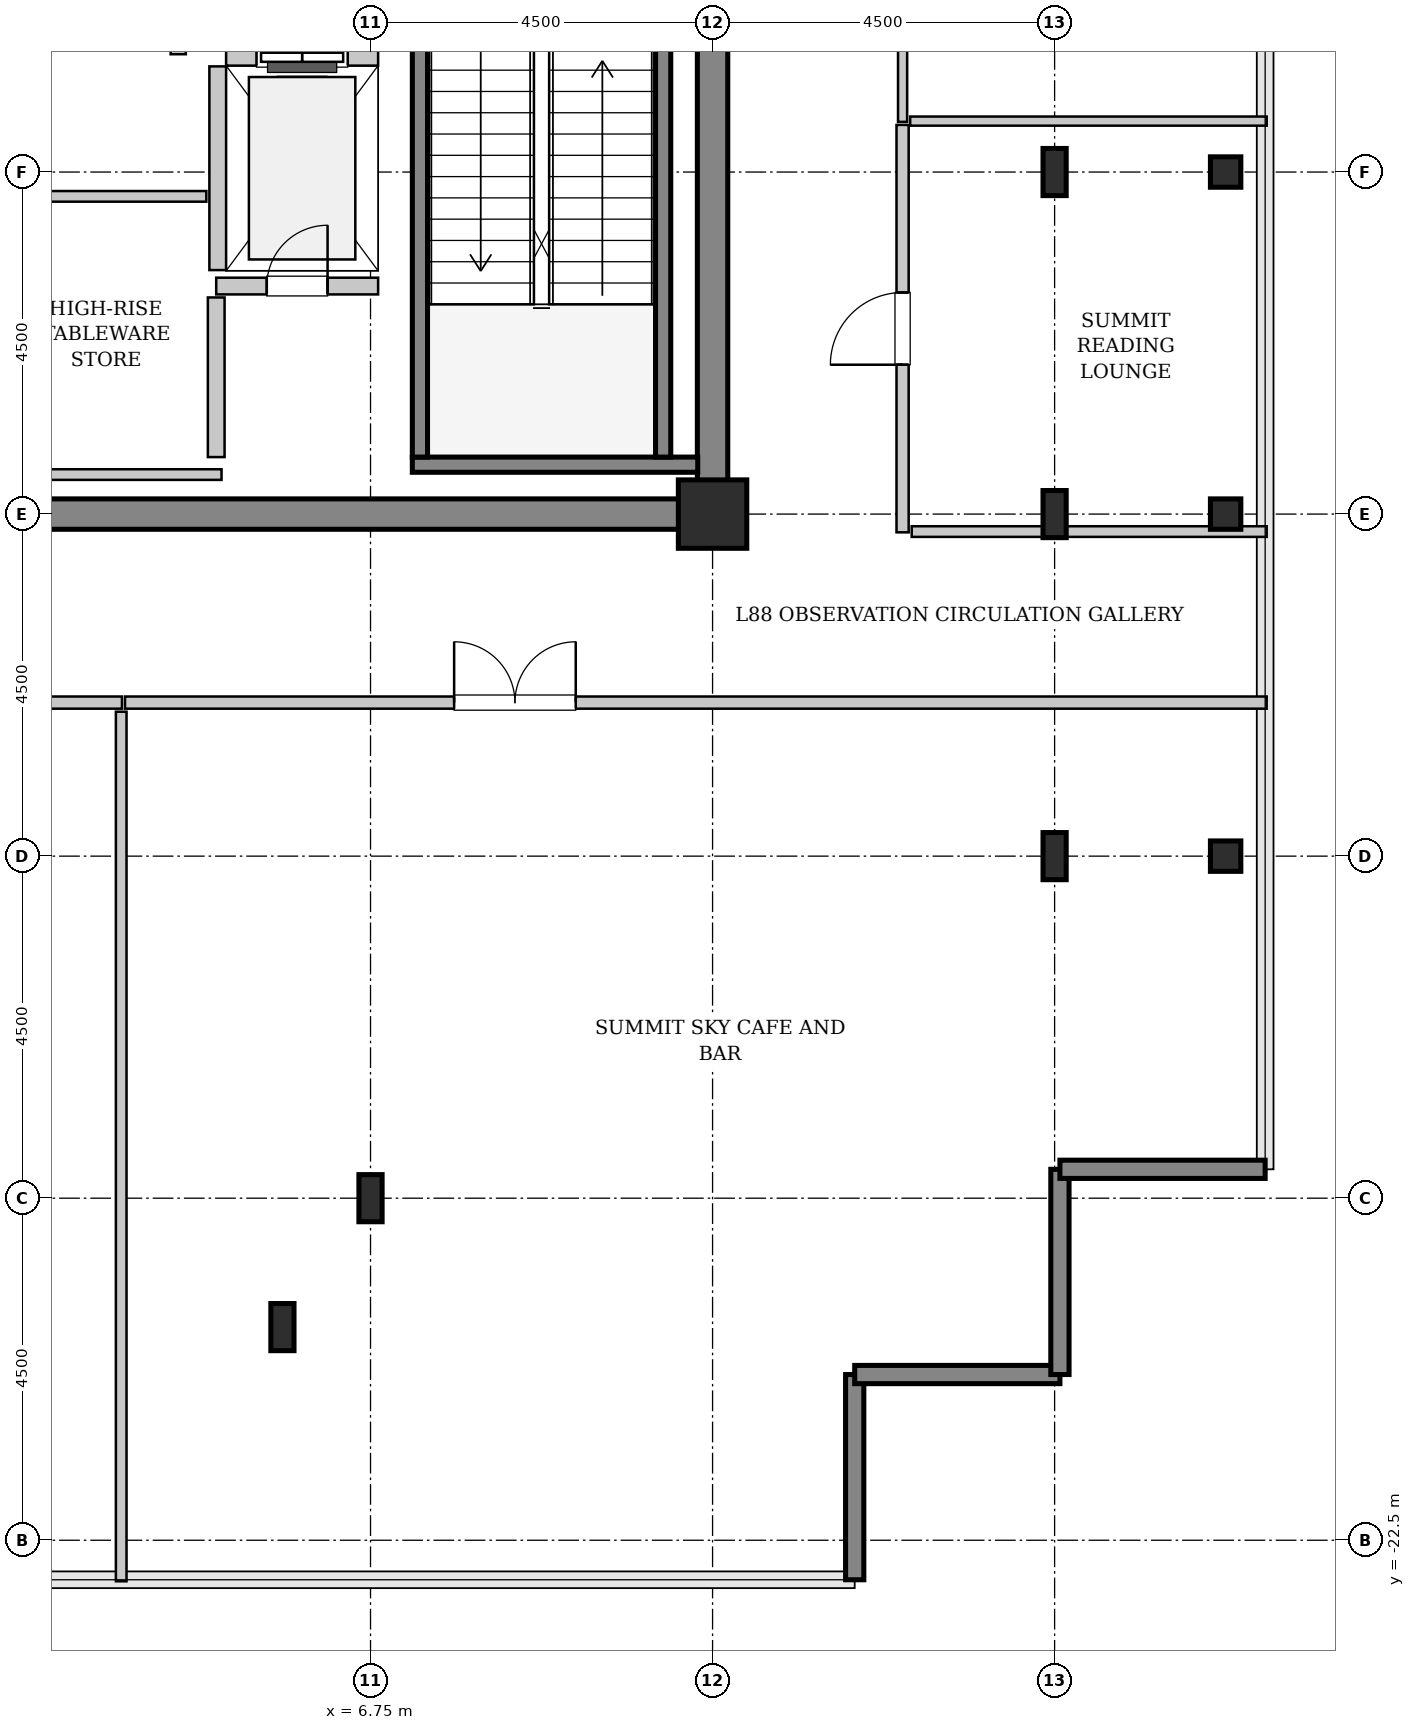
"""IFC4 building model, lengths in metres.
Left out: names, types, materials, properties, quantities, classifications, styles, units other than length and angle.
Written with IfcOpenShell. Run it as: python <this file> out.ifc"""

import sys

from ifc_helpers import new_model, si_unit, direction, frame, frame_2d, origin, origin_2d, place, context, subcontext, project, spatial, rectangle, hollow_rectangle, i_section, extrude, source, transform, mapped, element, fill, save


model = new_model("IFC4")
c1 = context("Model", 3, precision=1e-05, world=origin(), true_north=direction((0.0, 1.0)))
c2 = subcontext(c1, "Body", "Model", "MODEL_VIEW")
j1 = project(units=[si_unit("LENGTHUNIT", "METRE"), si_unit("PLANEANGLEUNIT", "RADIAN")], contexts=[c1])
p1 = place(None, origin())
s1 = spatial("IfcSite", under=j1, at=p1, CompositionType="ELEMENT")
p2 = place(p1, origin())
s2 = spatial("IfcBuilding", under=s1, at=p2, CompositionType="ELEMENT")
p3 = place(p2, frame((0.0, 0.0, 349.0)))
s3 = spatial("IfcBuildingStorey", under=s2, at=p3, CompositionType="ELEMENT", Elevation=349.0)
m1 = source(origin(), c2, "Body", "SweptSolid", [
    extrude(rectangle(XDim=9.9, YDim=0.4, at=frame_2d((4.95, 0.0))), origin(), (0.0, 0.0, 1.0), 4.8),
])
p4 = place(p3, frame((1.55, -9.0, 0.0), z_axis=(0.0, 0.0, 1.0), x_axis=(1.0, 0.0, 0.0)))
e1 = element("IfcWall", 1, at=p4, inside=s3, PredefinedType="SHEAR", context=c2, shape_type="MappedRepresentation", body=[
    mapped(m1, transform((0.0, 0.0, 0.0), x_axis=(1.0, 0.0, 0.0), y_axis=(0.0, 1.0, 0.0), z_axis=(0.0, 0.0, 1.0), scale=1.0)),
])
m2 = source(origin(), c2, "Body", "SweptSolid", [
    extrude(rectangle(XDim=7.45, YDim=0.4, at=frame_2d((3.725, 0.0))), origin(), (0.0, 0.0, 1.0), 4.8),
])
p5 = place(p3, frame((11.25, -8.8, 0.0), z_axis=(0.0, 0.0, 1.0), x_axis=(0.0, 1.0, 0.0)))
e2 = element("IfcWall", 2, at=p5, inside=s3, PredefinedType="SHEAR", context=c2, shape_type="MappedRepresentation", body=[
    mapped(m2, transform((0.0, 0.0, 0.0), x_axis=(1.0, 0.0, 0.0), y_axis=(0.0, 1.0, 0.0), z_axis=(0.0, 0.0, 1.0), scale=1.0)),
])
m3 = source(origin(), c2, "Body", "SweptSolid", [
    extrude(i_section(OverallWidth=0.305, OverallDepth=0.62, WebThickness=0.021, FlangeThickness=0.04, FilletRadius=0.027, at=origin_2d()), origin(), (0.0, 0.0, 1.0), 4.8),
])
for number, where, z_axis, x_axis in (
    (3, (5.591, -19.696, 0.0), (0.0, 0.0, 1.0), (1.0, 0.0, 0.0)),
    (4, (6.75, -18.0, 0.0), (0.0, 0.0, 1.0), (1.0, 0.0, 0.0)),
):
    element("IfcColumn", number, at=place(p3, frame(where, z_axis=z_axis, x_axis=x_axis)), inside=s3, PredefinedType="COLUMN", context=c2, shape_type="MappedRepresentation", body=[
        mapped(m3, transform((0.0, 0.0, 0.0), x_axis=(1.0, 0.0, 0.0), y_axis=(0.0, 1.0, 0.0), z_axis=(0.0, 0.0, 1.0), scale=1.0)),
    ])
m4 = source(origin(), c2, "Body", "SweptSolid", [
    extrude(rectangle(XDim=0.9, YDim=0.9, at=origin_2d()), origin(), (0.0, 0.0, 1.0), 4.8),
])
p6 = place(p3, frame((11.25, -9.0, 0.0), z_axis=(0.0, 0.0, 1.0), x_axis=(1.0, 0.0, 0.0)))
e5 = element("IfcColumn", 5, at=p6, inside=s3, PredefinedType="COLUMN", context=c2, shape_type="MappedRepresentation", body=[
    mapped(m4, transform((0.0, 0.0, 0.0), x_axis=(1.0, 0.0, 0.0), y_axis=(0.0, 1.0, 0.0), z_axis=(0.0, 0.0, 1.0), scale=1.0)),
])
for number, where, z_axis, x_axis in (
    (6, (15.75, -13.5, 0.0), (0.0, 0.0, 1.0), (1.0, 0.0, 0.0)),
    (7, (15.75, -9.0, 0.0), (0.0, 0.0, 1.0), (1.0, 0.0, 0.0)),
    (8, (15.75, -4.5, 0.0), (0.0, 0.0, 1.0), (1.0, 0.0, 0.0)),
):
    element("IfcColumn", number, at=place(p3, frame(where, z_axis=z_axis, x_axis=x_axis)), inside=s3, PredefinedType="COLUMN", context=c2, shape_type="MappedRepresentation", body=[
        mapped(m3, transform((0.0, 0.0, 0.0), x_axis=(1.0, 0.0, 0.0), y_axis=(0.0, 1.0, 0.0), z_axis=(0.0, 0.0, 1.0), scale=1.0)),
    ])
m5 = source(origin(), c2, "Body", "SweptSolid", [
    extrude(hollow_rectangle(XDim=0.4, YDim=0.4, WallThickness=0.02, InnerFilletRadius=0.02, OuterFilletRadius=0.04, at=origin_2d()), origin(), (0.0, 0.0, 1.0), 4.8),
])
for number, where, z_axis, x_axis in (
    (9, (18.0, -13.5, 0.0), (0.0, 0.0, 1.0), (1.0, 0.0, 0.0)),
    (10, (18.0, -9.0, 0.0), (0.0, 0.0, 1.0), (1.0, 0.0, 0.0)),
    (11, (18.0, -4.5, 0.0), (0.0, 0.0, 1.0), (1.0, 0.0, 0.0)),
):
    element("IfcColumn", number, at=place(p3, frame(where, z_axis=z_axis, x_axis=x_axis)), inside=s3, PredefinedType="COLUMN", context=c2, shape_type="MappedRepresentation", body=[
        mapped(m5, transform((0.0, 0.0, 0.0), x_axis=(1.0, 0.0, 0.0), y_axis=(0.0, 1.0, 0.0), z_axis=(0.0, 0.0, 1.0), scale=1.0)),
    ])
m6 = source(origin(), c2, "Body", "SweptSolid", [
    extrude(rectangle(XDim=2.7, YDim=0.24, at=frame_2d((1.35, 0.0))), origin(), (0.0, 0.0, 1.0), 4.5),
])
for number, where, z_axis, x_axis in (
    (12, (13.12, -23.02, 0.0), (0.0, 0.0, 1.0), (0.0, 1.0, 0.0)),
    (13, (13.12, -20.32, 0.0), (0.0, 0.0, 1.0), (1.0, 0.0, 0.0)),
    (14, (15.82, -20.32, 0.0), (0.0, 0.0, 1.0), (0.0, 1.0, 0.0)),
    (15, (15.82, -17.62, 0.0), (0.0, 0.0, 1.0), (1.0, 0.0, 0.0)),
):
    element("IfcWall", number, at=place(p3, frame(where, z_axis=z_axis, x_axis=x_axis)), inside=s3, PredefinedType="SHEAR", context=c2, shape_type="MappedRepresentation", body=[
        mapped(m6, transform((0.0, 0.0, 0.0), x_axis=(1.0, 0.0, 0.0), y_axis=(0.0, 1.0, 0.0), z_axis=(0.0, 0.0, 1.0), scale=1.0)),
    ])
m7 = source(origin(), c2, "Body", "SweptSolid", [
    extrude(rectangle(XDim=3.755, YDim=0.2, at=frame_2d((1.877, 0.0))), origin(), (0.0, 0.0, 1.0), 4.8),
])
p7 = place(p3, frame((7.3, -8.35, 0.0), z_axis=(0.0, 0.0, 1.0), x_axis=(1.0, 0.0, 0.0)))
e16 = element("IfcWall", 16, at=p7, inside=s3, PredefinedType="SOLIDWALL", context=c2, shape_type="MappedRepresentation", body=[
    mapped(m7, transform((0.0, 0.0, 0.0), x_axis=(1.0, 0.0, 0.0), y_axis=(0.0, 1.0, 0.0), z_axis=(0.0, 0.0, 1.0), scale=1.0)),
])
m8 = source(origin(), c2, "Body", "SweptSolid", [
    extrude(rectangle(XDim=7.1, YDim=0.2, at=frame_2d((3.55, 0.0))), origin(), (0.0, 0.0, 1.0), 4.8),
])
p8 = place(p3, frame((7.4, -1.15, 0.0), z_axis=(0.0, 0.0, 1.0), x_axis=(0.0, -1.0, 0.0)))
e17 = element("IfcWall", 17, at=p8, inside=s3, PredefinedType="SOLIDWALL", context=c2, shape_type="MappedRepresentation", body=[
    mapped(m8, transform((0.0, 0.0, 0.0), x_axis=(1.0, 0.0, 0.0), y_axis=(0.0, 1.0, 0.0), z_axis=(0.0, 0.0, 1.0), scale=1.0)),
])
p9 = place(p8, frame((0.18, 0.0, 0.0)))
e18 = element("IfcOpeningElement", 18, at=p9, cuts=e17, PredefinedType="OPENING", context=c2, shape_type="SweptSolid", body=[
    extrude(rectangle(XDim=1.1, YDim=2.15, at=frame_2d((0.55, 1.075))), frame((0.0, 0.11, 0.0), z_axis=(0.0, -1.0, 0.0), x_axis=(1.0, 0.0, 0.0)), (0.0, 0.0, 1.0), 0.22),
])
p10 = place(p3, frame((10.6, -1.15, 0.0), z_axis=(0.0, 0.0, 1.0), x_axis=(0.0, -1.0, 0.0)))
e19 = element("IfcWall", 19, at=p10, inside=s3, PredefinedType="SOLIDWALL", context=c2, shape_type="MappedRepresentation", body=[
    mapped(m8, transform((0.0, 0.0, 0.0), x_axis=(1.0, 0.0, 0.0), y_axis=(0.0, 1.0, 0.0), z_axis=(0.0, 0.0, 1.0), scale=1.0)),
])
m9 = source(origin(), c2, "Body", "SweptSolid", [
    extrude(rectangle(XDim=2.0, YDim=0.22, at=frame_2d((1.0, 0.0))), origin(), (0.0, 0.0, 1.0), 4.485),
])
p11 = place(p3, frame((6.85, -2.99, 0.0), z_axis=(0.0, 0.0, 1.0), x_axis=(-1.0, 0.0, 0.0)))
e20 = element("IfcWall", 20, at=p11, inside=s3, PredefinedType="SOLIDWALL", context=c2, shape_type="MappedRepresentation", body=[
    mapped(m9, transform((0.0, 0.0, 0.0), x_axis=(1.0, 0.0, 0.0), y_axis=(0.0, 1.0, 0.0), z_axis=(0.0, 0.0, 1.0), scale=1.0)),
])
p12 = place(p11, frame((0.4, 0.0, 0.0)))
e21 = element("IfcOpeningElement", 21, at=p12, cuts=e20, PredefinedType="OPENING", context=c2, shape_type="SweptSolid", body=[
    extrude(rectangle(XDim=1.2, YDim=2.2, at=frame_2d((0.6, 1.1))), frame((0.0, 0.12, 0.0), z_axis=(0.0, -1.0, 0.0), x_axis=(1.0, 0.0, 0.0)), (0.0, 0.0, 1.0), 0.24),
])
m10 = source(origin(), c2, "Body", "SweptSolid", [
    extrude(rectangle(XDim=2.68, YDim=0.22, at=frame_2d((1.34, 0.0))), origin(), (0.0, 0.0, 1.0), 4.485),
])
p13 = place(p3, frame((4.74, -3.11, 0.0), z_axis=(0.0, 0.0, 1.0), x_axis=(0.0, -1.0, 0.0)))
e22 = element("IfcWall", 22, at=p13, inside=s3, PredefinedType="SOLIDWALL", context=c2, shape_type="MappedRepresentation", body=[
    mapped(m10, transform((0.0, 0.0, 0.0), x_axis=(1.0, 0.0, 0.0), y_axis=(0.0, 1.0, 0.0), z_axis=(0.0, 0.0, 1.0), scale=1.0)),
])
m11 = source(origin(), c2, "Body", "SweptSolid", [
    extrude(rectangle(XDim=2.13, YDim=0.22, at=frame_2d((1.065, 0.0))), origin(), (0.0, 0.0, 1.0), 4.485),
])
p14 = place(p3, frame((4.72, -6.0, 0.0), z_axis=(0.0, 0.0, 1.0), x_axis=(1.0, 0.0, 0.0)))
e23 = element("IfcWall", 23, at=p14, inside=s3, PredefinedType="SOLIDWALL", context=c2, shape_type="MappedRepresentation", body=[
    mapped(m11, transform((0.0, 0.0, 0.0), x_axis=(1.0, 0.0, 0.0), y_axis=(0.0, 1.0, 0.0), z_axis=(0.0, 0.0, 1.0), scale=1.0)),
])
p15 = place(p14, frame((0.665, 0.0, 0.0)))
e24 = element("IfcOpeningElement", 24, at=p15, cuts=e23, PredefinedType="OPENING", context=c2, shape_type="SweptSolid", body=[
    extrude(rectangle(XDim=0.8, YDim=2.0, at=frame_2d((0.4, 1.0))), frame((0.0, 0.12, 0.0), z_axis=(0.0, -1.0, 0.0), x_axis=(1.0, 0.0, 0.0)), (0.0, 0.0, 1.0), 0.24),
])
m12 = source(origin(), c2, "Body", "SweptSolid", [
    extrude(rectangle(XDim=2.1, YDim=0.22, at=frame_2d((1.05, 0.0))), origin(), (0.0, 0.0, 1.0), 4.485),
])
p16 = place(p3, frame((4.72, -8.25, 0.0), z_axis=(0.0, 0.0, 1.0), x_axis=(0.0, 1.0, 0.0)))
e25 = element("IfcWall", 25, at=p16, inside=s3, PredefinedType="SOLIDWALL", context=c2, shape_type="MappedRepresentation", body=[
    mapped(m12, transform((0.0, 0.0, 0.0), x_axis=(1.0, 0.0, 0.0), y_axis=(0.0, 1.0, 0.0), z_axis=(0.0, 0.0, 1.0), scale=1.0)),
])
m13 = source(origin(), c2, "Body", "SweptSolid", [
    extrude(rectangle(XDim=5.9, YDim=0.2, at=frame_2d((2.95, 0.0))), origin(), (0.0, 0.0, 1.0), 4.485),
])
p17 = place(p3, frame((4.22, -2.95, 0.0), z_axis=(0.0, 0.0, 1.0), x_axis=(0.0, 1.0, 0.0)))
e26 = element("IfcWall", 26, at=p17, inside=s3, PredefinedType="PARTITIONING", context=c2, shape_type="MappedRepresentation", body=[
    mapped(m13, transform((0.0, 0.0, 0.0), x_axis=(1.0, 0.0, 0.0), y_axis=(0.0, 1.0, 0.0), z_axis=(0.0, 0.0, 1.0), scale=1.0)),
])
m14 = source(origin(), c2, "Body", "SweptSolid", [
    extrude(rectangle(XDim=2.95, YDim=0.14, at=frame_2d((1.475, 0.0))), origin(), (0.0, 0.0, 1.0), 4.485),
])
p18 = place(p3, frame((1.64, -4.82, 0.0), z_axis=(0.0, 0.0, 1.0), x_axis=(1.0, 0.0, 0.0)))
e27 = element("IfcWall", 27, at=p18, inside=s3, PredefinedType="PARTITIONING", context=c2, shape_type="MappedRepresentation", body=[
    mapped(m14, transform((0.0, 0.0, 0.0), x_axis=(1.0, 0.0, 0.0), y_axis=(0.0, 1.0, 0.0), z_axis=(0.0, 0.0, 1.0), scale=1.0)),
])
m15 = source(origin(), c2, "Body", "SweptSolid", [
    extrude(rectangle(XDim=3.15, YDim=0.14, at=frame_2d((1.575, 0.0))), origin(), (0.0, 0.0, 1.0), 4.485),
])
p19 = place(p3, frame((1.64, -8.48, 0.0), z_axis=(0.0, 0.0, 1.0), x_axis=(1.0, 0.0, 0.0)))
e28 = element("IfcWall", 28, at=p19, inside=s3, PredefinedType="PARTITIONING", context=c2, shape_type="MappedRepresentation", body=[
    mapped(m15, transform((0.0, 0.0, 0.0), x_axis=(1.0, 0.0, 0.0), y_axis=(0.0, 1.0, 0.0), z_axis=(0.0, 0.0, 1.0), scale=1.0)),
])
m16 = source(origin(), c2, "Body", "SweptSolid", [
    extrude(rectangle(XDim=28.77, YDim=0.16, at=frame_2d((14.385, 0.0))), origin(), (0.0, 0.0, 1.0), 4.485),
])
p20 = place(p3, frame((-25.29, -11.48, 0.0), z_axis=(0.0, 0.0, 1.0), x_axis=(1.0, 0.0, 0.0)))
e29 = element("IfcWall", 29, at=p20, inside=s3, PredefinedType="PARTITIONING", context=c2, shape_type="MappedRepresentation", body=[
    mapped(m16, transform((0.0, 0.0, 0.0), x_axis=(1.0, 0.0, 0.0), y_axis=(0.0, 1.0, 0.0), z_axis=(0.0, 0.0, 1.0), scale=1.0)),
])
p21 = place(p20, frame((19.34, 0.0, 0.0)))
e30 = element("IfcOpeningElement", 30, at=p21, cuts=e29, PredefinedType="OPENING", context=c2, shape_type="SweptSolid", body=[
    extrude(rectangle(XDim=1.6, YDim=2.3, at=frame_2d((0.8, 1.15))), frame((0.0, 0.09, 0.0), z_axis=(0.0, -1.0, 0.0), x_axis=(1.0, 0.0, 0.0)), (0.0, 0.0, 1.0), 0.18),
])
m17 = source(origin(), c2, "Body", "SweptSolid", [
    extrude(rectangle(XDim=11.44, YDim=0.14, at=frame_2d((5.72, 0.0))), origin(), (0.0, 0.0, 1.0), 4.485),
])
p22 = place(p3, frame((3.47, -23.04, 0.0), z_axis=(0.0, 0.0, 1.0), x_axis=(0.0, 1.0, 0.0)))
e31 = element("IfcWall", 31, at=p22, inside=s3, PredefinedType="PARTITIONING", context=c2, shape_type="MappedRepresentation", body=[
    mapped(m17, transform((0.0, 0.0, 0.0), x_axis=(1.0, 0.0, 0.0), y_axis=(0.0, 1.0, 0.0), z_axis=(0.0, 0.0, 1.0), scale=1.0)),
])
m18 = source(origin(), c2, "Body", "SweptSolid", [
    extrude(rectangle(XDim=15.02, YDim=0.16, at=frame_2d((7.51, 0.0))), origin(), (0.0, 0.0, 1.0), 4.485),
])
p23 = place(p3, frame((3.52, -11.48, 0.0), z_axis=(0.0, 0.0, 1.0), x_axis=(1.0, 0.0, 0.0)))
e32 = element("IfcWall", 32, at=p23, inside=s3, PredefinedType="PARTITIONING", context=c2, shape_type="MappedRepresentation", body=[
    mapped(m18, transform((0.0, 0.0, 0.0), x_axis=(1.0, 0.0, 0.0), y_axis=(0.0, 1.0, 0.0), z_axis=(0.0, 0.0, 1.0), scale=1.0)),
])
p24 = place(p23, frame((4.33, 0.0, 0.0)))
e33 = element("IfcOpeningElement", 33, at=p24, cuts=e32, PredefinedType="OPENING", context=c2, shape_type="SweptSolid", body=[
    extrude(rectangle(XDim=1.6, YDim=2.3, at=frame_2d((0.8, 1.15))), frame((0.0, 0.09, 0.0), z_axis=(0.0, -1.0, 0.0), x_axis=(1.0, 0.0, 0.0)), (0.0, 0.0, 1.0), 0.18),
])
m19 = source(origin(), c2, "Body", "SweptSolid", [
    extrude(rectangle(XDim=3.78, YDim=0.12, at=frame_2d((1.89, 0.0))), origin(), (0.0, 0.0, 1.0), 4.485),
])
p25 = place(p3, frame((13.75, -3.84, 0.0), z_axis=(0.0, 0.0, 1.0), x_axis=(0.0, 1.0, 0.0)))
e34 = element("IfcWall", 34, at=p25, inside=s3, PredefinedType="PLUMBINGWALL", context=c2, shape_type="MappedRepresentation", body=[
    mapped(m19, transform((0.0, 0.0, 0.0), x_axis=(1.0, 0.0, 0.0), y_axis=(0.0, 1.0, 0.0), z_axis=(0.0, 0.0, 1.0), scale=1.0)),
])
p26 = place(p25, frame((1.465, 0.0, 0.0)))
e35 = element("IfcOpeningElement", 35, at=p26, cuts=e34, PredefinedType="OPENING", context=c2, shape_type="SweptSolid", body=[
    extrude(rectangle(XDim=0.85, YDim=2.1, at=frame_2d((0.425, 1.05))), frame((0.0, 0.07, 0.0), z_axis=(0.0, -1.0, 0.0), x_axis=(1.0, 0.0, 0.0)), (0.0, 0.0, 1.0), 0.14),
])
m20 = source(origin(), c2, "Body", "SweptSolid", [
    extrude(rectangle(XDim=4.69, YDim=0.12, at=frame_2d((2.345, 0.0))), origin(), (0.0, 0.0, 1.0), 4.485),
])
p27 = place(p3, frame((13.85, -3.83, 0.0), z_axis=(0.0, 0.0, 1.0), x_axis=(1.0, 0.0, 0.0)))
e36 = element("IfcWall", 36, at=p27, inside=s3, PredefinedType="PLUMBINGWALL", context=c2, shape_type="MappedRepresentation", body=[
    mapped(m20, transform((0.0, 0.0, 0.0), x_axis=(1.0, 0.0, 0.0), y_axis=(0.0, 1.0, 0.0), z_axis=(0.0, 0.0, 1.0), scale=1.0)),
])
m21 = source(origin(), c2, "Body", "SweptSolid", [
    extrude(rectangle(XDim=5.36, YDim=0.16, at=frame_2d((2.68, 0.0))), origin(), (0.0, 0.0, 1.0), 4.485),
])
p28 = place(p3, frame((13.75, -9.24, 0.0), z_axis=(0.0, 0.0, 1.0), x_axis=(0.0, 1.0, 0.0)))
e37 = element("IfcWall", 37, at=p28, inside=s3, PredefinedType="PARTITIONING", context=c2, shape_type="MappedRepresentation", body=[
    mapped(m21, transform((0.0, 0.0, 0.0), x_axis=(1.0, 0.0, 0.0), y_axis=(0.0, 1.0, 0.0), z_axis=(0.0, 0.0, 1.0), scale=1.0)),
])
p29 = place(p28, frame((2.205, 0.0, 0.0)))
e38 = element("IfcOpeningElement", 38, at=p29, cuts=e37, PredefinedType="OPENING", context=c2, shape_type="SweptSolid", body=[
    extrude(rectangle(XDim=0.95, YDim=2.1, at=frame_2d((0.475, 1.05))), frame((0.0, 0.09, 0.0), z_axis=(0.0, -1.0, 0.0), x_axis=(1.0, 0.0, 0.0)), (0.0, 0.0, 1.0), 0.18),
])
m22 = source(origin(), c2, "Body", "SweptSolid", [
    extrude(rectangle(XDim=4.67, YDim=0.14, at=frame_2d((2.335, 0.0))), origin(), (0.0, 0.0, 1.0), 3.925),
])
p30 = place(p3, frame((13.87, -9.23, 0.0), z_axis=(0.0, 0.0, 1.0), x_axis=(1.0, 0.0, 0.0)))
e39 = element("IfcWall", 39, at=p30, inside=s3, PredefinedType="PARTITIONING", context=c2, shape_type="MappedRepresentation", body=[
    mapped(m22, transform((0.0, 0.0, 0.0), x_axis=(1.0, 0.0, 0.0), y_axis=(0.0, 1.0, 0.0), z_axis=(0.0, 0.0, 1.0), scale=1.0)),
])
m23 = source(origin(), c2, "Body", "SweptSolid", [
    extrude(rectangle(XDim=1.2, YDim=2.2, at=frame_2d((0.6, 1.1))), frame((0.0, 0.025, 0.0), z_axis=(0.0, -1.0, 0.0), x_axis=(1.0, 0.0, 0.0)), (0.0, 0.0, 1.0), 0.05),
])
p31 = place(p12, origin())
e40 = element("IfcDoor", 40, at=p31, inside=s3, OperationType="SLIDING_TO_LEFT", PredefinedType="DOOR", context=c2, shape_type="MappedRepresentation", body=[
    mapped(m23, transform((0.0, 0.0, 0.0), x_axis=(1.0, 0.0, 0.0), y_axis=(0.0, 1.0, 0.0), z_axis=(0.0, 0.0, 1.0), scale=1.0)),
])
fill(e21, e40)
m24 = source(origin(), c2, "Body", "SweptSolid", [
    extrude(rectangle(XDim=0.8, YDim=2.0, at=frame_2d((0.4, 1.0))), frame((0.0, 0.025, 0.0), z_axis=(0.0, -1.0, 0.0), x_axis=(1.0, 0.0, 0.0)), (0.0, 0.0, 1.0), 0.05),
])
p32 = place(p15, origin())
e41 = element("IfcDoor", 41, at=p32, inside=s3, OperationType="SINGLE_SWING_RIGHT", PredefinedType="TRAPDOOR", context=c2, shape_type="MappedRepresentation", body=[
    mapped(m24, transform((0.0, 0.0, 0.0), x_axis=(1.0, 0.0, 0.0), y_axis=(0.0, 1.0, 0.0), z_axis=(0.0, 0.0, 1.0), scale=1.0)),
])
fill(e24, e41)
m25 = source(origin(), c2, "Body", "SweptSolid", [
    extrude(rectangle(XDim=1.6, YDim=2.3, at=frame_2d((0.8, 1.15))), frame((0.0, 0.025, 0.0), z_axis=(0.0, -1.0, 0.0), x_axis=(1.0, 0.0, 0.0)), (0.0, 0.0, 1.0), 0.05),
])
p33 = place(p24, origin())
e42 = element("IfcDoor", 42, at=p33, inside=s3, OperationType="DOUBLE_DOOR_SINGLE_SWING", PredefinedType="DOOR", context=c2, shape_type="MappedRepresentation", body=[
    mapped(m25, transform((0.0, 0.0, 0.0), x_axis=(1.0, 0.0, 0.0), y_axis=(0.0, 1.0, 0.0), z_axis=(0.0, 0.0, 1.0), scale=1.0)),
])
fill(e33, e42)
m26 = source(origin(), c2, "Body", "SweptSolid", [
    extrude(rectangle(XDim=0.95, YDim=2.1, at=frame_2d((0.475, 1.05))), frame((0.0, 0.025, 0.0), z_axis=(0.0, -1.0, 0.0), x_axis=(1.0, 0.0, 0.0)), (0.0, 0.0, 1.0), 0.05),
])
p34 = place(p29, origin())
e43 = element("IfcDoor", 43, at=p34, inside=s3, OperationType="SINGLE_SWING_LEFT", PredefinedType="DOOR", context=c2, shape_type="MappedRepresentation", body=[
    mapped(m26, transform((0.0, 0.0, 0.0), x_axis=(1.0, 0.0, 0.0), y_axis=(0.0, 1.0, 0.0), z_axis=(0.0, 0.0, 1.0), scale=1.0)),
])
fill(e38, e43)
save(model, sys.argv[1])
